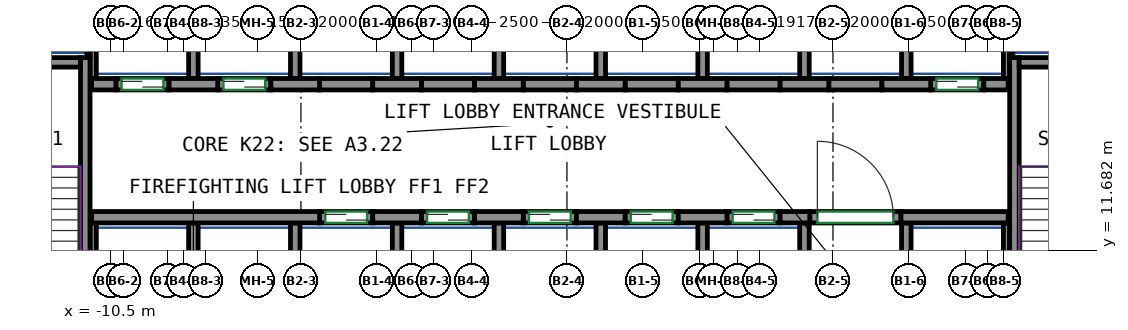
"""IFC4 building model, lengths in metres.
Left out: names, types, materials, properties, quantities, classifications, styles, units other than length and angle.
Written with IfcOpenShell. Run it as: python <this file> out.ifc"""

import sys

from ifc_helpers import new_model, si_unit, direction, frame, frame_2d, origin, place, context, subcontext, project, spatial, rectangle, extrude, source, transform, mapped, element, fill, save


model = new_model("IFC4")
c1 = context("Model", 3, precision=1e-05, world=origin(), true_north=direction((0.0, 1.0)))
c2 = subcontext(c1, "Body", "Model", "MODEL_VIEW")
j1 = project(units=[si_unit("LENGTHUNIT", "METRE"), si_unit("PLANEANGLEUNIT", "RADIAN")], contexts=[c1])
p1 = place(None, origin())
s1 = spatial("IfcSite", under=j1, at=p1, CompositionType="ELEMENT")
p2 = place(p1, origin())
s2 = spatial("IfcBuilding", under=s1, at=p2, CompositionType="ELEMENT")
p3 = place(p2, frame((0.0, 0.0, 91.2)))
s3 = spatial("IfcBuildingStorey", under=s2, at=p3, CompositionType="ELEMENT", Elevation=91.2)
m1 = source(origin(), c2, "Body", "SweptSolid", [
    extrude(rectangle(XDim=7.75, YDim=0.25, at=frame_2d((3.875, 0.0))), origin(), (0.0, 0.0, 1.0), 3.6),
])
p4 = place(p3, frame((-11.175, 9.0, 0.0), z_axis=(0.0, 0.0, 1.0), x_axis=(0.0, 1.0, 0.0)))
e1 = element("IfcWall", 1, at=p4, inside=s3, PredefinedType="SHEAR", context=c2, shape_type="MappedRepresentation", body=[
    mapped(m1, transform((0.0, 0.0, 0.0))),
])
m2 = source(origin(), c2, "Body", "SweptSolid", [
    extrude(rectangle(XDim=3.7, YDim=0.25, at=frame_2d((1.85, 0.0))), origin(), (0.0, 0.0, 1.0), 3.6),
])
p5 = place(p3, frame((-15.0, 16.625, 0.0), z_axis=(0.0, 0.0, 1.0), x_axis=(1.0, 0.0, 0.0)))
e2 = element("IfcWall", 2, at=p5, inside=s3, PredefinedType="SHEAR", context=c2, shape_type="MappedRepresentation", body=[
    mapped(m2, transform((0.0, 0.0, 0.0))),
])
p6 = place(p3, frame((13.275, 9.0, 0.0), z_axis=(0.0, 0.0, 1.0), x_axis=(0.0, 1.0, 0.0)))
e3 = element("IfcWall", 3, at=p6, inside=s3, PredefinedType="SHEAR", context=c2, shape_type="MappedRepresentation", body=[
    mapped(m1, transform((0.0, 0.0, 0.0))),
])
m3 = source(origin(), c2, "Body", "SweptSolid", [
    extrude(rectangle(XDim=3.7, YDim=0.25, at=frame_2d((1.85, 0.0))), origin(), (0.0, 0.0, 1.0), 3.6),
])
p7 = place(p3, frame((13.4, 16.625, 0.0), z_axis=(0.0, 0.0, 1.0), x_axis=(1.0, 0.0, 0.0)))
e4 = element("IfcWall", 4, at=p7, inside=s3, PredefinedType="SHEAR", context=c2, shape_type="MappedRepresentation", body=[
    mapped(m3, transform((0.0, 0.0, 0.0))),
])
m4 = source(origin(), c2, "Body", "SweptSolid", [
    extrude(rectangle(XDim=6.0, YDim=0.3, at=frame_2d((3.0, 0.0))), origin(), (0.0, 0.0, 1.0), 3.6),
])
p8 = place(p3, frame((-11.01, 12.55, 0.0), z_axis=(0.0, 0.0, 1.0), x_axis=(1.0, 0.0, 0.0)))
e5 = element("IfcWall", 5, at=p8, inside=s3, PredefinedType="SHEAR", context=c2, shape_type="MappedRepresentation", body=[
    mapped(m4, transform((0.0, 0.0, 0.0))),
])
m5 = source(origin(), c2, "Body", "SweptSolid", [
    extrude(rectangle(XDim=1.28, YDim=0.3, at=frame_2d((0.64, 0.0))), origin(), (0.0, 0.0, 1.0), 3.6),
])
for number, where, z_axis, x_axis in (
    (6, (-3.61, 12.55, 0.0), (0.0, 0.0, 1.0), (1.0, 0.0, 0.0)),
    (7, (-0.93, 12.55, 0.0), (0.0, 0.0, 1.0), (1.0, 0.0, 0.0)),
    (8, (1.75, 12.55, 0.0), (0.0, 0.0, 1.0), (1.0, 0.0, 0.0)),
    (9, (4.43, 12.55, 0.0), (0.0, 0.0, 1.0), (1.0, 0.0, 0.0)),
):
    element("IfcWall", number, at=place(p3, frame(where, z_axis=z_axis, x_axis=x_axis)), inside=s3, PredefinedType="SHEAR", context=c2, shape_type="MappedRepresentation", body=[
        mapped(m5, transform((0.0, 0.0, 0.0))),
    ])
m6 = source(origin(), c2, "Body", "SweptSolid", [
    extrude(rectangle(XDim=0.78, YDim=0.3, at=frame_2d((0.39, 0.0))), origin(), (0.0, 0.0, 1.0), 3.6),
])
p9 = place(p3, frame((7.11, 12.55, 0.0), z_axis=(0.0, 0.0, 1.0), x_axis=(1.0, 0.0, 0.0)))
e10 = element("IfcWall", 10, at=p9, inside=s3, PredefinedType="SHEAR", context=c2, shape_type="MappedRepresentation", body=[
    mapped(m6, transform((0.0, 0.0, 0.0))),
])
m7 = source(origin(), c2, "Body", "SweptSolid", [
    extrude(rectangle(XDim=2.82, YDim=0.3, at=frame_2d((1.41, 0.0))), origin(), (0.0, 0.0, 1.0), 3.6),
])
p10 = place(p3, frame((10.29, 12.55, 0.0), z_axis=(0.0, 0.0, 1.0), x_axis=(1.0, 0.0, 0.0)))
e11 = element("IfcWall", 11, at=p10, inside=s3, PredefinedType="SHEAR", context=c2, shape_type="MappedRepresentation", body=[
    mapped(m7, transform((0.0, 0.0, 0.0))),
])
m8 = source(origin(), c2, "Body", "SweptSolid", [
    extrude(rectangle(XDim=0.64, YDim=0.3, at=frame_2d((0.32, 0.0))), origin(), (0.0, 0.0, 1.0), 3.6),
])
p11 = place(p3, frame((-11.01, 16.05, 0.0), z_axis=(0.0, 0.0, 1.0), x_axis=(1.0, 0.0, 0.0)))
e12 = element("IfcWall", 12, at=p11, inside=s3, PredefinedType="SHEAR", context=c2, shape_type="MappedRepresentation", body=[
    mapped(m8, transform((0.0, 0.0, 0.0))),
])
for number, where, z_axis, x_axis in (
    (13, (-8.97, 16.05, 0.0), (0.0, 0.0, 1.0), (1.0, 0.0, 0.0)),
    (14, (-6.29, 16.05, 0.0), (0.0, 0.0, 1.0), (1.0, 0.0, 0.0)),
    (15, (-3.61, 16.05, 0.0), (0.0, 0.0, 1.0), (1.0, 0.0, 0.0)),
    (16, (-0.93, 16.05, 0.0), (0.0, 0.0, 1.0), (1.0, 0.0, 0.0)),
    (17, (1.75, 16.05, 0.0), (0.0, 0.0, 1.0), (1.0, 0.0, 0.0)),
    (18, (4.43, 16.05, 0.0), (0.0, 0.0, 1.0), (1.0, 0.0, 0.0)),
):
    element("IfcWall", number, at=place(p3, frame(where, z_axis=z_axis, x_axis=x_axis)), inside=s3, PredefinedType="SHEAR", context=c2, shape_type="MappedRepresentation", body=[
        mapped(m5, transform((0.0, 0.0, 0.0))),
    ])
m9 = source(origin(), c2, "Body", "SweptSolid", [
    extrude(rectangle(XDim=1.28, YDim=0.3, at=frame_2d((0.64, 0.0))), origin(), (0.0, 0.0, 1.0), 3.6),
])
p12 = place(p3, frame((7.11, 16.05, 0.0), z_axis=(0.0, 0.0, 1.0), x_axis=(1.0, 0.0, 0.0)))
e19 = element("IfcWall", 19, at=p12, inside=s3, PredefinedType="SHEAR", context=c2, shape_type="MappedRepresentation", body=[
    mapped(m9, transform((0.0, 0.0, 0.0))),
])
p13 = place(p3, frame((9.79, 16.05, 0.0), z_axis=(0.0, 0.0, 1.0), x_axis=(1.0, 0.0, 0.0)))
e20 = element("IfcWall", 20, at=p13, inside=s3, PredefinedType="SHEAR", context=c2, shape_type="MappedRepresentation", body=[
    mapped(m5, transform((0.0, 0.0, 0.0))),
])
m10 = source(origin(), c2, "Body", "SweptSolid", [
    extrude(rectangle(XDim=0.64, YDim=0.3, at=frame_2d((0.32, 0.0))), origin(), (0.0, 0.0, 1.0), 3.6),
])
p14 = place(p3, frame((12.47, 16.05, 0.0), z_axis=(0.0, 0.0, 1.0), x_axis=(1.0, 0.0, 0.0)))
e21 = element("IfcWall", 21, at=p14, inside=s3, PredefinedType="SHEAR", context=c2, shape_type="MappedRepresentation", body=[
    mapped(m10, transform((0.0, 0.0, 0.0))),
])
m11 = source(origin(), c2, "Body", "SweptSolid", [
    extrude(rectangle(XDim=1.4, YDim=0.3, at=frame_2d((0.7, 0.0))), origin(), (0.0, 0.0, 1.0), 3.6),
])
p15 = place(p3, frame((-5.01, 12.55, 0.0), z_axis=(0.0, 0.0, 1.0), x_axis=(1.0, 0.0, 0.0)))
e22 = element("IfcWall", 22, at=p15, inside=s3, PredefinedType="PARTITIONING", context=c2, shape_type="MappedRepresentation", body=[
    mapped(m11, transform((0.0, 0.0, 0.0))),
])
p16 = place(p15, frame((0.15, 0.0, 0.0)))
e23 = element("IfcOpeningElement", 23, at=p16, cuts=e22, PredefinedType="OPENING", context=c2, shape_type="SweptSolid", body=[
    extrude(rectangle(XDim=1.1, YDim=2.1, at=frame_2d((0.55, 1.05))), frame((0.0, 0.16, 0.0), z_axis=(0.0, -1.0, 0.0), x_axis=(1.0, 0.0, 0.0)), (0.0, 0.0, 1.0), 0.32),
])
m12 = source(origin(), c2, "Body", "SweptSolid", [
    extrude(rectangle(XDim=1.4, YDim=0.3, at=frame_2d((0.7, 0.0))), origin(), (0.0, 0.0, 1.0), 3.6),
])
p17 = place(p3, frame((-2.33, 12.55, 0.0), z_axis=(0.0, 0.0, 1.0), x_axis=(1.0, 0.0, 0.0)))
e24 = element("IfcWall", 24, at=p17, inside=s3, PredefinedType="PARTITIONING", context=c2, shape_type="MappedRepresentation", body=[
    mapped(m12, transform((0.0, 0.0, 0.0))),
])
p18 = place(p17, frame((0.15, 0.0, 0.0)))
e25 = element("IfcOpeningElement", 25, at=p18, cuts=e24, PredefinedType="OPENING", context=c2, shape_type="SweptSolid", body=[
    extrude(rectangle(XDim=1.1, YDim=2.1, at=frame_2d((0.55, 1.05))), frame((0.0, 0.16, 0.0), z_axis=(0.0, -1.0, 0.0), x_axis=(1.0, 0.0, 0.0)), (0.0, 0.0, 1.0), 0.32),
])
p19 = place(p3, frame((0.35, 12.55, 0.0), z_axis=(0.0, 0.0, 1.0), x_axis=(1.0, 0.0, 0.0)))
e26 = element("IfcWall", 26, at=p19, inside=s3, PredefinedType="PARTITIONING", context=c2, shape_type="MappedRepresentation", body=[
    mapped(m11, transform((0.0, 0.0, 0.0))),
])
p20 = place(p19, frame((0.15, 0.0, 0.0)))
e27 = element("IfcOpeningElement", 27, at=p20, cuts=e26, PredefinedType="OPENING", context=c2, shape_type="SweptSolid", body=[
    extrude(rectangle(XDim=1.1, YDim=2.1, at=frame_2d((0.55, 1.05))), frame((0.0, 0.16, 0.0), z_axis=(0.0, -1.0, 0.0), x_axis=(1.0, 0.0, 0.0)), (0.0, 0.0, 1.0), 0.32),
])
p21 = place(p3, frame((3.03, 12.55, 0.0), z_axis=(0.0, 0.0, 1.0), x_axis=(1.0, 0.0, 0.0)))
e28 = element("IfcWall", 28, at=p21, inside=s3, PredefinedType="PARTITIONING", context=c2, shape_type="MappedRepresentation", body=[
    mapped(m11, transform((0.0, 0.0, 0.0))),
])
p22 = place(p21, frame((0.15, 0.0, 0.0)))
e29 = element("IfcOpeningElement", 29, at=p22, cuts=e28, PredefinedType="OPENING", context=c2, shape_type="SweptSolid", body=[
    extrude(rectangle(XDim=1.1, YDim=2.1, at=frame_2d((0.55, 1.05))), frame((0.0, 0.16, 0.0), z_axis=(0.0, -1.0, 0.0), x_axis=(1.0, 0.0, 0.0)), (0.0, 0.0, 1.0), 0.32),
])
p23 = place(p3, frame((5.71, 12.55, 0.0), z_axis=(0.0, 0.0, 1.0), x_axis=(1.0, 0.0, 0.0)))
e30 = element("IfcWall", 30, at=p23, inside=s3, PredefinedType="PARTITIONING", context=c2, shape_type="MappedRepresentation", body=[
    mapped(m12, transform((0.0, 0.0, 0.0))),
])
p24 = place(p23, frame((0.15, 0.0, 0.0)))
e31 = element("IfcOpeningElement", 31, at=p24, cuts=e30, PredefinedType="OPENING", context=c2, shape_type="SweptSolid", body=[
    extrude(rectangle(XDim=1.1, YDim=2.1, at=frame_2d((0.55, 1.05))), frame((0.0, 0.16, 0.0), z_axis=(0.0, -1.0, 0.0), x_axis=(1.0, 0.0, 0.0)), (0.0, 0.0, 1.0), 0.32),
])
p25 = place(p3, frame((11.07, 16.05, 0.0), z_axis=(0.0, 0.0, 1.0), x_axis=(1.0, 0.0, 0.0)))
e32 = element("IfcWall", 32, at=p25, inside=s3, PredefinedType="PARTITIONING", context=c2, shape_type="MappedRepresentation", body=[
    mapped(m11, transform((0.0, 0.0, 0.0))),
])
p26 = place(p25, frame((0.15, 0.0, 0.0)))
e33 = element("IfcOpeningElement", 33, at=p26, cuts=e32, PredefinedType="OPENING", context=c2, shape_type="SweptSolid", body=[
    extrude(rectangle(XDim=1.1, YDim=2.1, at=frame_2d((0.55, 1.05))), frame((0.0, 0.16, 0.0), z_axis=(0.0, -1.0, 0.0), x_axis=(1.0, 0.0, 0.0)), (0.0, 0.0, 1.0), 0.32),
])
p27 = place(p3, frame((-10.37, 16.05, 0.0), z_axis=(0.0, 0.0, 1.0), x_axis=(1.0, 0.0, 0.0)))
e34 = element("IfcWall", 34, at=p27, inside=s3, PredefinedType="PARTITIONING", context=c2, shape_type="MappedRepresentation", body=[
    mapped(m12, transform((0.0, 0.0, 0.0))),
])
p28 = place(p27, frame((0.15, 0.0, 0.0)))
e35 = element("IfcOpeningElement", 35, at=p28, cuts=e34, PredefinedType="OPENING", context=c2, shape_type="SweptSolid", body=[
    extrude(rectangle(XDim=1.1, YDim=2.1, at=frame_2d((0.55, 1.05))), frame((0.0, 0.16, 0.0), z_axis=(0.0, -1.0, 0.0), x_axis=(1.0, 0.0, 0.0)), (0.0, 0.0, 1.0), 0.32),
])
p29 = place(p3, frame((-7.69, 16.05, 0.0), z_axis=(0.0, 0.0, 1.0), x_axis=(1.0, 0.0, 0.0)))
e36 = element("IfcWall", 36, at=p29, inside=s3, PredefinedType="PARTITIONING", context=c2, shape_type="MappedRepresentation", body=[
    mapped(m11, transform((0.0, 0.0, 0.0))),
])
p30 = place(p29, frame((0.15, 0.0, 0.0)))
e37 = element("IfcOpeningElement", 37, at=p30, cuts=e36, PredefinedType="OPENING", context=c2, shape_type="SweptSolid", body=[
    extrude(rectangle(XDim=1.1, YDim=2.1, at=frame_2d((0.55, 1.05))), frame((0.0, 0.16, 0.0), z_axis=(0.0, -1.0, 0.0), x_axis=(1.0, 0.0, 0.0)), (0.0, 0.0, 1.0), 0.32),
])
m13 = source(origin(), c2, "Body", "SweptSolid", [
    extrude(rectangle(XDim=2.4, YDim=0.3, at=frame_2d((1.2, 0.0))), origin(), (0.0, 0.0, 1.0), 3.6),
])
p31 = place(p3, frame((7.89, 12.55, 0.0), z_axis=(0.0, 0.0, 1.0), x_axis=(1.0, 0.0, 0.0)))
e38 = element("IfcWall", 38, at=p31, inside=s3, PredefinedType="PARTITIONING", context=c2, shape_type="MappedRepresentation", body=[
    mapped(m13, transform((0.0, 0.0, 0.0))),
])
p32 = place(p31, frame((0.2, 0.0, 0.0)))
e39 = element("IfcOpeningElement", 39, at=p32, cuts=e38, PredefinedType="OPENING", context=c2, shape_type="SweptSolid", body=[
    extrude(rectangle(XDim=2.0, YDim=2.1, at=frame_2d((1.0, 1.05))), frame((0.0, 0.16, 0.0), z_axis=(0.0, -1.0, 0.0), x_axis=(1.0, 0.0, 0.0)), (0.0, 0.0, 1.0), 0.32),
])
p33 = place(p3, frame((-5.01, 16.05, 0.0), z_axis=(0.0, 0.0, 1.0), x_axis=(1.0, 0.0, 0.0)))
e40 = element("IfcWall", 40, at=p33, inside=s3, PredefinedType="PARTITIONING", context=c2, shape_type="MappedRepresentation", body=[
    mapped(m11, transform((0.0, 0.0, 0.0))),
])
p34 = place(p3, frame((-2.33, 16.05, 0.0), z_axis=(0.0, 0.0, 1.0), x_axis=(1.0, 0.0, 0.0)))
e41 = element("IfcWall", 41, at=p34, inside=s3, PredefinedType="PARTITIONING", context=c2, shape_type="MappedRepresentation", body=[
    mapped(m12, transform((0.0, 0.0, 0.0))),
])
for number, where, z_axis, x_axis in (
    (42, (0.35, 16.05, 0.0), (0.0, 0.0, 1.0), (1.0, 0.0, 0.0)),
    (43, (3.03, 16.05, 0.0), (0.0, 0.0, 1.0), (1.0, 0.0, 0.0)),
):
    element("IfcWall", number, at=place(p3, frame(where, z_axis=z_axis, x_axis=x_axis)), inside=s3, PredefinedType="PARTITIONING", context=c2, shape_type="MappedRepresentation", body=[
        mapped(m11, transform((0.0, 0.0, 0.0))),
    ])
for number, where, z_axis, x_axis in (
    (44, (5.71, 16.05, 0.0), (0.0, 0.0, 1.0), (1.0, 0.0, 0.0)),
    (45, (8.39, 16.05, 0.0), (0.0, 0.0, 1.0), (1.0, 0.0, 0.0)),
):
    element("IfcWall", number, at=place(p3, frame(where, z_axis=z_axis, x_axis=x_axis)), inside=s3, PredefinedType="PARTITIONING", context=c2, shape_type="MappedRepresentation", body=[
        mapped(m12, transform((0.0, 0.0, 0.0))),
    ])
m14 = source(origin(), c2, "Body", "SweptSolid", [
    extrude(rectangle(XDim=3.275, YDim=0.165, at=frame_2d((1.638, 0.0))), origin(), (0.0, 0.0, 1.0), 3.6),
])
for number, where, z_axis, x_axis in (
    (46, (13.067, 16.2, 0.0), (0.0, 0.0, 1.0), (0.0, 1.0, 0.0)),
    (47, (-10.968, 16.2, 0.0), (0.0, 0.0, 1.0), (0.0, 1.0, 0.0)),
):
    element("IfcWall", number, at=place(p3, frame(where, z_axis=z_axis, x_axis=x_axis)), inside=s3, PredefinedType="PARTITIONING", context=c2, shape_type="MappedRepresentation", body=[
        mapped(m14, transform((0.0, 0.0, 0.0))),
    ])
m15 = source(origin(), c2, "Body", "SweptSolid", [
    extrude(rectangle(XDim=3.275, YDim=0.25, at=frame_2d((1.638, 0.0))), origin(), (0.0, 0.0, 1.0), 3.6),
])
p35 = place(p3, frame((10.43, 16.2, 0.0), z_axis=(0.0, 0.0, 1.0), x_axis=(0.0, 1.0, 0.0)))
e48 = element("IfcWall", 48, at=p35, inside=s3, PredefinedType="PARTITIONING", context=c2, shape_type="MappedRepresentation", body=[
    mapped(m15, transform((0.0, 0.0, 0.0))),
])
m16 = source(origin(), c2, "Body", "SweptSolid", [
    extrude(rectangle(XDim=2.725, YDim=0.085, at=frame_2d((1.363, 0.0))), origin(), (0.0, 0.0, 1.0), 3.6),
])
p36 = place(p3, frame((13.192, 16.75, 0.0), z_axis=(0.0, 0.0, 1.0), x_axis=(0.0, 1.0, 0.0)))
e49 = element("IfcWall", 49, at=p36, inside=s3, PredefinedType="PARTITIONING", context=c2, shape_type="MappedRepresentation", body=[
    mapped(m16, transform((0.0, 0.0, 0.0))),
])
for number, where, z_axis, x_axis in (
    (50, (2.39, 16.2, 0.0), (0.0, 0.0, 1.0), (0.0, 1.0, 0.0)),
    (51, (5.07, 16.2, 0.0), (0.0, 0.0, 1.0), (0.0, 1.0, 0.0)),
    (52, (7.75, 16.2, 0.0), (0.0, 0.0, 1.0), (0.0, 1.0, 0.0)),
    (53, (-0.29, 16.2, 0.0), (0.0, 0.0, 1.0), (0.0, 1.0, 0.0)),
):
    element("IfcWall", number, at=place(p3, frame(where, z_axis=z_axis, x_axis=x_axis)), inside=s3, PredefinedType="PARTITIONING", context=c2, shape_type="MappedRepresentation", body=[
        mapped(m15, transform((0.0, 0.0, 0.0))),
    ])
p37 = place(p3, frame((-11.093, 16.75, 0.0), z_axis=(0.0, 0.0, 1.0), x_axis=(0.0, 1.0, 0.0)))
e54 = element("IfcWall", 54, at=p37, inside=s3, PredefinedType="PARTITIONING", context=c2, shape_type="MappedRepresentation", body=[
    mapped(m16, transform((0.0, 0.0, 0.0))),
])
for number, where, z_axis, x_axis in (
    (55, (-2.97, 16.2, 0.0), (0.0, 0.0, 1.0), (0.0, 1.0, 0.0)),
    (56, (-5.65, 16.2, 0.0), (0.0, 0.0, 1.0), (0.0, 1.0, 0.0)),
    (57, (-8.33, 16.2, 0.0), (0.0, 0.0, 1.0), (0.0, 1.0, 0.0)),
):
    element("IfcWall", number, at=place(p3, frame(where, z_axis=z_axis, x_axis=x_axis)), inside=s3, PredefinedType="PARTITIONING", context=c2, shape_type="MappedRepresentation", body=[
        mapped(m15, transform((0.0, 0.0, 0.0))),
    ])
m17 = source(origin(), c2, "Body", "SweptSolid", [
    extrude(rectangle(XDim=3.4, YDim=0.25, at=frame_2d((1.7, 0.0))), origin(), (0.0, 0.0, 1.0), 3.6),
])
p38 = place(p3, frame((10.43, 9.0, 0.0), z_axis=(0.0, 0.0, 1.0), x_axis=(0.0, 1.0, 0.0)))
e58 = element("IfcWall", 58, at=p38, inside=s3, PredefinedType="PARTITIONING", context=c2, shape_type="MappedRepresentation", body=[
    mapped(m17, transform((0.0, 0.0, 0.0))),
])
m18 = source(origin(), c2, "Body", "SweptSolid", [
    extrude(rectangle(XDim=3.4, YDim=0.165, at=frame_2d((1.7, 0.0))), origin(), (0.0, 0.0, 1.0), 3.6),
])
p39 = place(p3, frame((13.067, 9.0, 0.0), z_axis=(0.0, 0.0, 1.0), x_axis=(0.0, 1.0, 0.0)))
e59 = element("IfcWall", 59, at=p39, inside=s3, PredefinedType="PARTITIONING", context=c2, shape_type="MappedRepresentation", body=[
    mapped(m18, transform((0.0, 0.0, 0.0))),
])
for number, where, z_axis, x_axis in (
    (60, (2.39, 9.0, 0.0), (0.0, 0.0, 1.0), (0.0, 1.0, 0.0)),
    (61, (5.07, 9.0, 0.0), (0.0, 0.0, 1.0), (0.0, 1.0, 0.0)),
    (62, (7.75, 9.0, 0.0), (0.0, 0.0, 1.0), (0.0, 1.0, 0.0)),
    (63, (-0.29, 9.0, 0.0), (0.0, 0.0, 1.0), (0.0, 1.0, 0.0)),
):
    element("IfcWall", number, at=place(p3, frame(where, z_axis=z_axis, x_axis=x_axis)), inside=s3, PredefinedType="PARTITIONING", context=c2, shape_type="MappedRepresentation", body=[
        mapped(m17, transform((0.0, 0.0, 0.0))),
    ])
p40 = place(p3, frame((-10.968, 9.0, 0.0), z_axis=(0.0, 0.0, 1.0), x_axis=(0.0, 1.0, 0.0)))
e64 = element("IfcWall", 64, at=p40, inside=s3, PredefinedType="PARTITIONING", context=c2, shape_type="MappedRepresentation", body=[
    mapped(m18, transform((0.0, 0.0, 0.0))),
])
for number, where, z_axis, x_axis in (
    (65, (-2.97, 9.0, 0.0), (0.0, 0.0, 1.0), (0.0, 1.0, 0.0)),
    (66, (-5.65, 9.0, 0.0), (0.0, 0.0, 1.0), (0.0, 1.0, 0.0)),
    (67, (-8.33, 9.0, 0.0), (0.0, 0.0, 1.0), (0.0, 1.0, 0.0)),
):
    element("IfcWall", number, at=place(p3, frame(where, z_axis=z_axis, x_axis=x_axis)), inside=s3, PredefinedType="PARTITIONING", context=c2, shape_type="MappedRepresentation", body=[
        mapped(m17, transform((0.0, 0.0, 0.0))),
    ])
p41 = place(p32, origin())
e68 = element("IfcDoor", 68, at=p41, inside=s3, OperationType="DOUBLE_DOOR_SINGLE_SWING", PredefinedType="DOOR", context=c2, shape_type="SweptSolid", body=[
    extrude(rectangle(XDim=2.0, YDim=2.1, at=frame_2d((1.0, 1.05))), frame((0.0, 0.025, 0.0), z_axis=(0.0, -1.0, 0.0), x_axis=(1.0, 0.0, 0.0)), (0.0, 0.0, 1.0), 0.05),
])
fill(e39, e68)
p42 = place(p16, origin())
e69 = element("IfcDoor", 69, at=p42, inside=s3, OperationType="DOUBLE_DOOR_SLIDING", PredefinedType="DOOR", context=c2, shape_type="SweptSolid", body=[
    extrude(rectangle(XDim=1.1, YDim=2.1, at=frame_2d((0.55, 1.05))), frame((0.0, 0.025, 0.0), z_axis=(0.0, -1.0, 0.0), x_axis=(1.0, 0.0, 0.0)), (0.0, 0.0, 1.0), 0.05),
])
fill(e23, e69)
p43 = place(p18, origin())
e70 = element("IfcDoor", 70, at=p43, inside=s3, OperationType="DOUBLE_DOOR_SLIDING", PredefinedType="DOOR", context=c2, shape_type="SweptSolid", body=[
    extrude(rectangle(XDim=1.1, YDim=2.1, at=frame_2d((0.55, 1.05))), frame((0.0, 0.025, 0.0), z_axis=(0.0, -1.0, 0.0), x_axis=(1.0, 0.0, 0.0)), (0.0, 0.0, 1.0), 0.05),
])
fill(e25, e70)
p44 = place(p20, origin())
e71 = element("IfcDoor", 71, at=p44, inside=s3, OperationType="DOUBLE_DOOR_SLIDING", PredefinedType="DOOR", context=c2, shape_type="SweptSolid", body=[
    extrude(rectangle(XDim=1.1, YDim=2.1, at=frame_2d((0.55, 1.05))), frame((0.0, 0.025, 0.0), z_axis=(0.0, -1.0, 0.0), x_axis=(1.0, 0.0, 0.0)), (0.0, 0.0, 1.0), 0.05),
])
fill(e27, e71)
p45 = place(p22, origin())
e72 = element("IfcDoor", 72, at=p45, inside=s3, OperationType="DOUBLE_DOOR_SLIDING", PredefinedType="DOOR", context=c2, shape_type="SweptSolid", body=[
    extrude(rectangle(XDim=1.1, YDim=2.1, at=frame_2d((0.55, 1.05))), frame((0.0, 0.025, 0.0), z_axis=(0.0, -1.0, 0.0), x_axis=(1.0, 0.0, 0.0)), (0.0, 0.0, 1.0), 0.05),
])
fill(e29, e72)
p46 = place(p24, origin())
e73 = element("IfcDoor", 73, at=p46, inside=s3, OperationType="DOUBLE_DOOR_SLIDING", PredefinedType="DOOR", context=c2, shape_type="SweptSolid", body=[
    extrude(rectangle(XDim=1.1, YDim=2.1, at=frame_2d((0.55, 1.05))), frame((0.0, 0.025, 0.0), z_axis=(0.0, -1.0, 0.0), x_axis=(1.0, 0.0, 0.0)), (0.0, 0.0, 1.0), 0.05),
])
fill(e31, e73)
p47 = place(p26, origin())
e74 = element("IfcDoor", 74, at=p47, inside=s3, OperationType="DOUBLE_DOOR_SLIDING", PredefinedType="DOOR", context=c2, shape_type="SweptSolid", body=[
    extrude(rectangle(XDim=1.1, YDim=2.1, at=frame_2d((0.55, 1.05))), frame((0.0, 0.025, 0.0), z_axis=(0.0, -1.0, 0.0), x_axis=(1.0, 0.0, 0.0)), (0.0, 0.0, 1.0), 0.05),
])
fill(e33, e74)
p48 = place(p28, origin())
e75 = element("IfcDoor", 75, at=p48, inside=s3, OperationType="DOUBLE_DOOR_SLIDING", PredefinedType="DOOR", context=c2, shape_type="SweptSolid", body=[
    extrude(rectangle(XDim=1.1, YDim=2.1, at=frame_2d((0.55, 1.05))), frame((0.0, 0.025, 0.0), z_axis=(0.0, -1.0, 0.0), x_axis=(1.0, 0.0, 0.0)), (0.0, 0.0, 1.0), 0.05),
])
fill(e35, e75)
p49 = place(p30, origin())
e76 = element("IfcDoor", 76, at=p49, inside=s3, OperationType="DOUBLE_DOOR_SLIDING", PredefinedType="DOOR", context=c2, shape_type="SweptSolid", body=[
    extrude(rectangle(XDim=1.1, YDim=2.1, at=frame_2d((0.55, 1.05))), frame((0.0, 0.025, 0.0), z_axis=(0.0, -1.0, 0.0), x_axis=(1.0, 0.0, 0.0)), (0.0, 0.0, 1.0), 0.05),
])
fill(e37, e76)
save(model, sys.argv[1])
